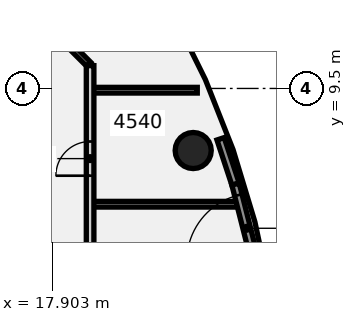
"""IFC4 building model, lengths in metres.
Left out: names, types, materials, properties, quantities, classifications, styles, units other than length and angle.
Written with IfcOpenShell. Run it as: python <this file> out.ifc"""

import sys

from ifc_helpers import new_model, si_unit, direction, frame, frame_2d, origin, origin_2d, place, context, subcontext, project, spatial, rectangle, circle, extrude, element, fill, save


model = new_model("IFC4")
c1 = context("Model", 3, precision=1e-05, world=origin(), true_north=direction((0.0, 1.0)))
c2 = subcontext(c1, "Body", "Model", "MODEL_VIEW")
j1 = project(units=[si_unit("LENGTHUNIT", "METRE"), si_unit("PLANEANGLEUNIT", "RADIAN")], contexts=[c1])
p1 = place(None, origin())
s1 = spatial("IfcSite", under=j1, at=p1, CompositionType="ELEMENT")
p2 = place(p1, origin())
s2 = spatial("IfcBuilding", under=s1, at=p2, CompositionType="ELEMENT")
p3 = place(p2, frame((0.0, 0.0, 182.5)))
s3 = spatial("IfcBuildingStorey", under=s2, at=p3, CompositionType="ELEMENT", Elevation=182.5)
p4 = place(p3, frame((21.613, 7.866, -0.14), z_axis=(0.0, 0.0, 1.0), x_axis=(1.0, 0.0, 0.0)))
e1 = element("IfcColumn", 1, at=p4, inside=s3, PredefinedType="COLUMN", context=c2, shape_type="SweptSolid", body=[
    extrude(circle(Radius=0.475, at=origin_2d()), origin(), (0.0, 0.0, 1.0), 3.6),
])
p5 = place(p3, frame((17.128, 11.872, 0.0), z_axis=(0.0, 0.0, 1.0), x_axis=(0.707106781187, -0.707106781187, 0.0)))
e2 = element("IfcWall", 2, at=p5, inside=s3, PredefinedType="PARTITIONING", context=c2, shape_type="SweptSolid", body=[
    extrude(rectangle(XDim=2.455, YDim=0.15, at=frame_2d((1.228, 0.0))), origin(), (0.0, 0.0, 1.0), 2.864),
])
p6 = place(p3, frame((18.985, 9.454, 0.0), z_axis=(0.0, 0.0, 1.0), x_axis=(1.0, 0.0, 0.0)))
e3 = element("IfcWall", 3, at=p6, inside=s3, PredefinedType="PARTITIONING", context=c2, shape_type="SweptSolid", body=[
    extrude(rectangle(XDim=2.735, YDim=0.15, at=frame_2d((1.368, 0.0))), origin(), (0.0, 0.0, 1.0), 2.864),
])
p7 = place(p3, frame((18.985, 6.454, 0.0), z_axis=(0.0, 0.0, 1.0), x_axis=(1.0, 0.0, 0.0)))
e4 = element("IfcWall", 4, at=p7, inside=s3, PredefinedType="PARTITIONING", context=c2, shape_type="SweptSolid", body=[
    extrude(rectangle(XDim=3.796, YDim=0.15, at=frame_2d((1.898, 0.0))), origin(), (0.0, 0.0, 1.0), 2.864),
])
p8 = place(p3, frame((18.9, -14.277, 0.0), z_axis=(0.0, 0.0, 1.0), x_axis=(0.0, 1.0, 0.0)))
e5 = element("IfcWall", 5, at=p8, inside=s3, PredefinedType="PARTITIONING", context=c2, shape_type="SweptSolid", body=[
    extrude(rectangle(XDim=24.377, YDim=0.2, at=frame_2d((12.188, 0.0))), origin(), (0.0, 0.0, 1.0), 2.864),
])
p9 = place(p8, frame((4.927, 0.0, 0.0)))
e6 = element("IfcOpeningElement", 6, at=p9, cuts=e5, PredefinedType="OPENING", context=c2, shape_type="SweptSolid", body=[
    extrude(rectangle(XDim=0.9, YDim=2.1, at=frame_2d((0.45, 1.05))), frame((0.0, 0.11, 0.0), z_axis=(0.0, -1.0, 0.0), x_axis=(1.0, 0.0, 0.0)), (0.0, 0.0, 1.0), 0.22),
])
p10 = place(p8, frame((21.481, 0.0, 0.0)))
e7 = element("IfcOpeningElement", 7, at=p10, cuts=e5, PredefinedType="OPENING", context=c2, shape_type="SweptSolid", body=[
    extrude(rectangle(XDim=0.9, YDim=2.1, at=frame_2d((0.45, 1.05))), frame((0.0, 0.11, 0.0), z_axis=(0.0, -1.0, 0.0), x_axis=(1.0, 0.0, 0.0)), (0.0, 0.0, 1.0), 0.22),
])
p11 = place(p3, frame((22.727, 6.983, 0.0), z_axis=(0.0, 0.0, 1.0), x_axis=(-0.313251199711, 0.949670303779, 0.0)))
e8 = element("IfcWall", 8, at=p11, inside=s3, PredefinedType="SOLIDWALL", context=c2, shape_type="SweptSolid", body=[
    extrude(rectangle(XDim=1.256, YDim=0.2, at=frame_2d((0.628, 0.0))), origin(), (0.0, 0.0, 1.0), 3.46),
])
p12 = place(p3, frame((23.317, 4.659, 0.0), z_axis=(0.0, 0.0, 1.0), x_axis=(-0.245959533272, 0.969280097801, 0.0)))
e9 = element("IfcWall", 9, at=p12, inside=s3, PredefinedType="SOLIDWALL", context=c2, shape_type="SweptSolid", body=[
    extrude(rectangle(XDim=2.398, YDim=0.2, at=frame_2d((1.199, 0.0))), origin(), (0.0, 0.0, 1.0), 3.46),
])
p13 = place(p12, frame((0.299, 0.0, 0.0)))
e10 = element("IfcOpeningElement", 10, at=p13, cuts=e9, PredefinedType="OPENING", context=c2, shape_type="SweptSolid", body=[
    extrude(rectangle(XDim=1.8, YDim=2.4, at=frame_2d((0.9, 1.2))), frame((0.0, 0.11, 0.0), z_axis=(0.0, -1.0, 0.0), x_axis=(1.0, 0.0, 0.0)), (0.0, 0.0, 1.0), 0.22),
])
p14 = place(p10, frame((0.9, 0.0, 0.0), z_axis=(0.0, 0.0, 1.0), x_axis=(-1.0, 0.0, 0.0)))
e11 = element("IfcDoor", 11, at=p14, inside=s3, OperationType="SINGLE_SWING_RIGHT", PredefinedType="DOOR", context=c2, shape_type="SweptSolid", body=[
    extrude(rectangle(XDim=0.9, YDim=2.1, at=frame_2d((0.45, 1.05))), frame((0.0, 0.025, 0.0), z_axis=(0.0, -1.0, 0.0), x_axis=(1.0, 0.0, 0.0)), (0.0, 0.0, 1.0), 0.05),
])
fill(e7, e11)
p15 = place(p13, origin())
e12 = element("IfcDoor", 12, at=p15, inside=s3, OperationType="SINGLE_SWING_LEFT", PredefinedType="DOOR", context=c2, shape_type="SweptSolid", body=[
    extrude(rectangle(XDim=1.8, YDim=2.4, at=frame_2d((0.9, 1.2))), frame((0.0, 0.025, 0.0), z_axis=(0.0, -1.0, 0.0), x_axis=(1.0, 0.0, 0.0)), (0.0, 0.0, 1.0), 0.05),
])
fill(e10, e12)
save(model, sys.argv[1])
